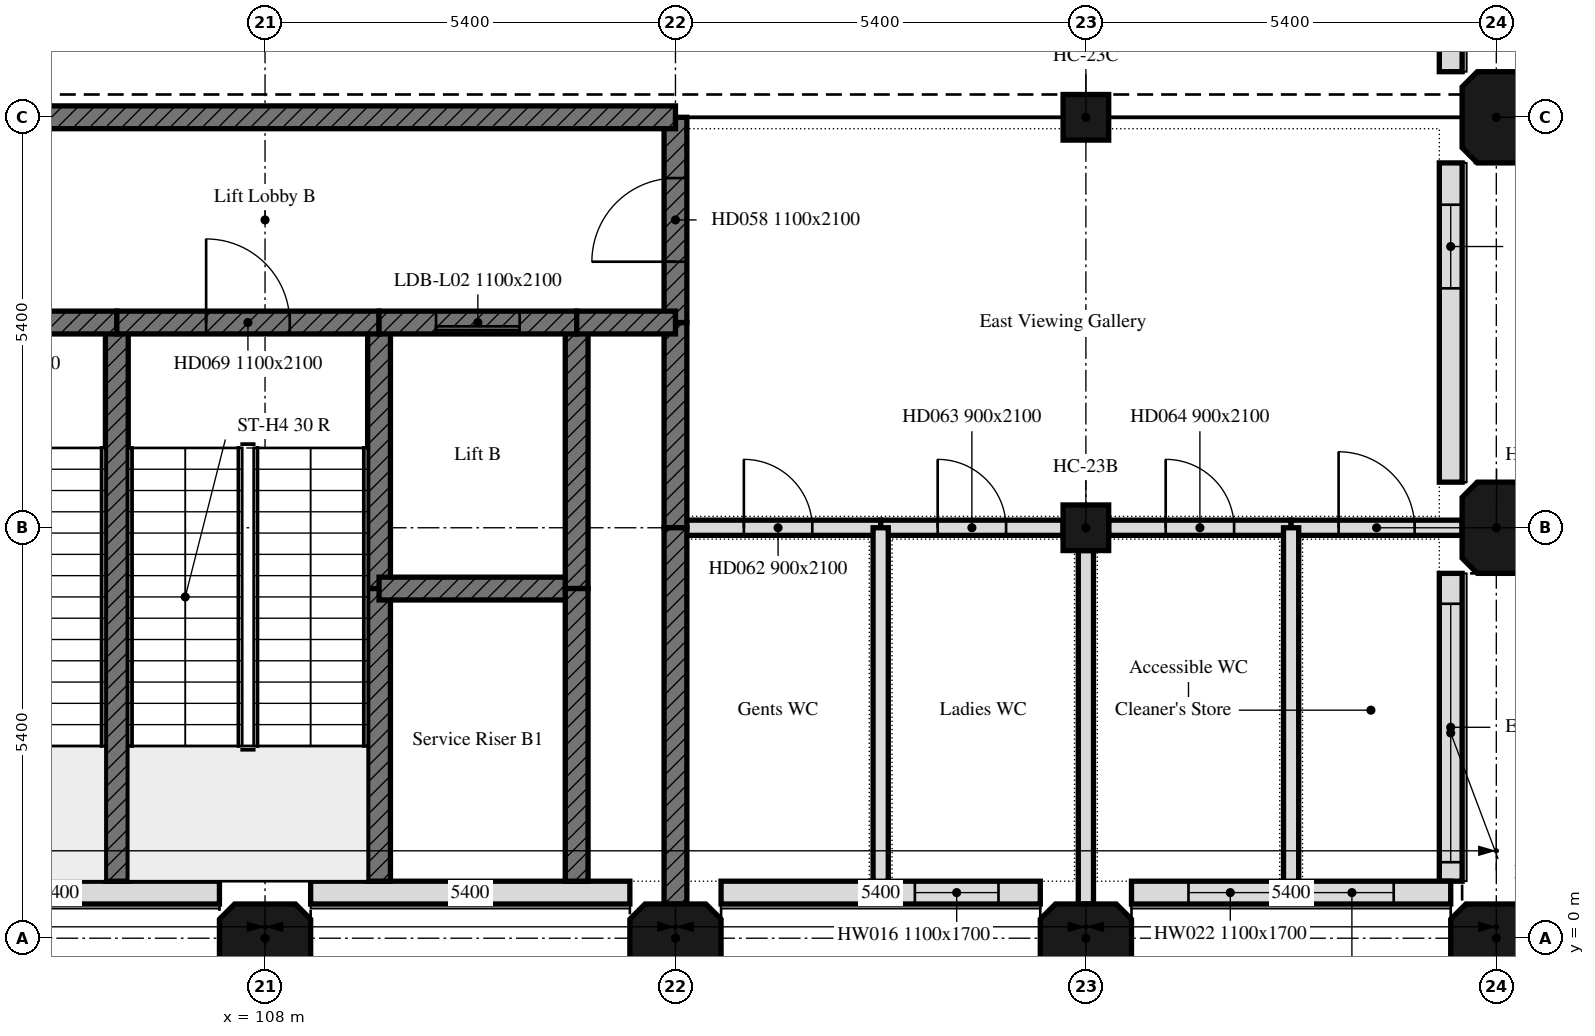
"""IFC4 building model, lengths in metres.
Left out: names, types, materials, properties, quantities, classifications, styles, units other than length and angle.
Written with IfcOpenShell. Run it as: python <this file> out.ifc"""

import sys

from ifc_helpers import new_model, si_unit, direction, frame, frame_2d, origin, origin_2d, place, context, subcontext, project, spatial, polyline, rectangle, outline, extrude, element, fill, save


model = new_model("IFC4")
c1 = context("Model", 3, precision=1e-05, world=origin(), true_north=direction((0.0, 1.0)))
c2 = subcontext(c1, "Body", "Model", "MODEL_VIEW")
j1 = project(units=[si_unit("LENGTHUNIT", "METRE"), si_unit("PLANEANGLEUNIT", "RADIAN")], contexts=[c1])
p1 = place(None, origin())
s1 = spatial("IfcSite", under=j1, at=p1, CompositionType="ELEMENT")
p2 = place(p1, origin())
s2 = spatial("IfcBuilding", under=s1, at=p2, CompositionType="ELEMENT")
p3 = place(p2, frame((0.0, 0.0, 14.4)))
s3 = spatial("IfcBuildingStorey", under=s2, at=p3, CompositionType="ELEMENT", Elevation=14.4)
for number, where, z_axis, x_axis in (
    (1, (108.0, 0.0, 0.0), (0.0, 0.0, 1.0), (1.0, 0.0, 0.0)),
    (2, (113.4, 0.0, 0.0), (0.0, 0.0, 1.0), (1.0, 0.0, 0.0)),
    (3, (118.8, 0.0, 0.0), (0.0, 0.0, 1.0), (1.0, 0.0, 0.0)),
):
    element("IfcColumn", number, at=place(p3, frame(where, z_axis=z_axis, x_axis=x_axis)), inside=s3, PredefinedType="COLUMN", context=c2, shape_type="SweptSolid", body=[
        extrude(outline(polyline([(-0.4, -0.45), (0.4, -0.45), (0.6, -0.25), (0.6, 0.25), (0.4, 0.45), (-0.4, 0.45), (-0.6, 0.25), (-0.6, -0.25), (-0.4, -0.45)])), origin(), (0.0, 0.0, 1.0), 5.1),
    ])
for number, where, z_axis, x_axis in (
    (4, (118.8, 5.4, 0.0), (0.0, 0.0, 1.0), (1.0, 0.0, 0.0)),
    (5, (118.8, 10.8, 0.0), (0.0, 0.0, 1.0), (1.0, 0.0, 0.0)),
):
    element("IfcColumn", number, at=place(p3, frame(where, z_axis=z_axis, x_axis=x_axis)), inside=s3, PredefinedType="COLUMN", context=c2, shape_type="SweptSolid", body=[
        extrude(rectangle(XDim=0.6, YDim=0.6, at=origin_2d()), origin(), (0.0, 0.0, 1.0), 5.1),
    ])
for number, where, z_axis, x_axis in (
    (6, (124.2, 0.0, 0.0), (0.0, 0.0, 1.0), (1.0, 0.0, 0.0)),
    (7, (124.2, 5.4, 0.0), (0.0, 0.0, 1.0), (0.0, 1.0, 0.0)),
    (8, (124.2, 10.8, 0.0), (0.0, 0.0, 1.0), (0.0, 1.0, 0.0)),
):
    element("IfcColumn", number, at=place(p3, frame(where, z_axis=z_axis, x_axis=x_axis)), inside=s3, PredefinedType="COLUMN", context=c2, shape_type="SweptSolid", body=[
        extrude(outline(polyline([(-0.4, -0.45), (0.4, -0.45), (0.6, -0.25), (0.6, 0.25), (0.4, 0.45), (-0.4, 0.45), (-0.6, 0.25), (-0.6, -0.25), (-0.4, -0.45)])), origin(), (0.0, 0.0, 1.0), 5.1),
    ])
for number, where, z_axis, x_axis in (
    (9, (103.2, 0.6, 0.0), (0.0, 0.0, 1.0), (1.0, 0.0, 0.0)),
    (10, (108.6, 0.6, 0.0), (0.0, 0.0, 1.0), (1.0, 0.0, 0.0)),
):
    element("IfcWall", number, at=place(p3, frame(where, z_axis=z_axis, x_axis=x_axis)), inside=s3, PredefinedType="SOLIDWALL", context=c2, shape_type="SweptSolid", body=[
        extrude(rectangle(XDim=4.2, YDim=0.3, at=frame_2d((2.1, 0.0))), origin(), (0.0, 0.0, 1.0), 5.1),
    ])
p4 = place(p3, frame((114.0, 0.6, 0.0), z_axis=(0.0, 0.0, 1.0), x_axis=(1.0, 0.0, 0.0)))
e11 = element("IfcWall", 11, at=p4, inside=s3, PredefinedType="SOLIDWALL", context=c2, shape_type="SweptSolid", body=[
    extrude(rectangle(XDim=4.2, YDim=0.3, at=frame_2d((2.1, 0.0))), origin(), (0.0, 0.0, 1.0), 5.1),
])
p5 = place(p4, frame((2.55, 0.0, 0.9)))
e12 = element("IfcOpeningElement", 12, at=p5, cuts=e11, PredefinedType="OPENING", context=c2, shape_type="SweptSolid", body=[
    extrude(rectangle(XDim=1.1, YDim=1.7, at=frame_2d((0.55, 0.85))), frame((0.0, 0.15, 0.0), z_axis=(0.0, -1.0, 0.0), x_axis=(1.0, 0.0, 0.0)), (0.0, 0.0, 1.0), 0.3),
])
p6 = place(p3, frame((119.4, 0.6, 0.0), z_axis=(0.0, 0.0, 1.0), x_axis=(1.0, 0.0, 0.0)))
e13 = element("IfcWall", 13, at=p6, inside=s3, PredefinedType="SOLIDWALL", context=c2, shape_type="SweptSolid", body=[
    extrude(rectangle(XDim=4.2, YDim=0.3, at=frame_2d((2.1, 0.0))), origin(), (0.0, 0.0, 1.0), 5.1),
])
p7 = place(p6, frame((0.75, 0.0, 0.9)))
e14 = element("IfcOpeningElement", 14, at=p7, cuts=e13, PredefinedType="OPENING", context=c2, shape_type="SweptSolid", body=[
    extrude(rectangle(XDim=1.1, YDim=1.7, at=frame_2d((0.55, 0.85))), frame((0.0, 0.15, 0.0), z_axis=(0.0, -1.0, 0.0), x_axis=(1.0, 0.0, 0.0)), (0.0, 0.0, 1.0), 0.3),
])
p8 = place(p6, frame((2.35, 0.0, 0.9)))
e15 = element("IfcOpeningElement", 15, at=p8, cuts=e13, PredefinedType="OPENING", context=c2, shape_type="SweptSolid", body=[
    extrude(rectangle(XDim=1.1, YDim=1.7, at=frame_2d((0.55, 0.85))), frame((0.0, 0.15, 0.0), z_axis=(0.0, -1.0, 0.0), x_axis=(1.0, 0.0, 0.0)), (0.0, 0.0, 1.0), 0.3),
])
p9 = place(p3, frame((123.6, 0.75, 0.0), z_axis=(0.0, 0.0, 1.0), x_axis=(0.0, 1.0, 0.0)))
e16 = element("IfcWall", 16, at=p9, inside=s3, PredefinedType="SOLIDWALL", context=c2, shape_type="SweptSolid", body=[
    extrude(rectangle(XDim=4.05, YDim=0.3, at=frame_2d((2.025, 0.0))), origin(), (0.0, 0.0, 1.0), 5.1),
])
p10 = place(p9, frame((0.25, 0.0, 0.9)))
e17 = element("IfcOpeningElement", 17, at=p10, cuts=e16, PredefinedType="OPENING", context=c2, shape_type="SweptSolid", body=[
    extrude(rectangle(XDim=3.4, YDim=1.7, at=frame_2d((1.7, 0.85))), frame((0.0, 0.15, 0.0), z_axis=(0.0, -1.0, 0.0), x_axis=(1.0, 0.0, 0.0)), (0.0, 0.0, 1.0), 0.3),
])
p11 = place(p3, frame((123.6, 6.0, 0.0), z_axis=(0.0, 0.0, 1.0), x_axis=(0.0, 1.0, 0.0)))
e18 = element("IfcWall", 18, at=p11, inside=s3, PredefinedType="SOLIDWALL", context=c2, shape_type="SweptSolid", body=[
    extrude(rectangle(XDim=4.2, YDim=0.3, at=frame_2d((2.1, 0.0))), origin(), (0.0, 0.0, 1.0), 5.1),
])
p12 = place(p11, frame((2.55, 0.0, 0.9)))
e19 = element("IfcOpeningElement", 19, at=p12, cuts=e18, PredefinedType="OPENING", context=c2, shape_type="SweptSolid", body=[
    extrude(rectangle(XDim=1.1, YDim=1.7, at=frame_2d((0.55, 0.85))), frame((0.0, 0.15, 0.0), z_axis=(0.0, -1.0, 0.0), x_axis=(1.0, 0.0, 0.0)), (0.0, 0.0, 1.0), 0.3),
])
p13 = place(p3, frame((123.6, 11.4, 0.0), z_axis=(0.0, 0.0, 1.0), x_axis=(0.0, 1.0, 0.0)))
e20 = element("IfcWall", 20, at=p13, inside=s3, PredefinedType="SOLIDWALL", context=c2, shape_type="SweptSolid", body=[
    extrude(rectangle(XDim=4.2, YDim=0.3, at=frame_2d((2.1, 0.0))), origin(), (0.0, 0.0, 1.0), 5.4),
])
p14 = place(p3, frame((113.4, 5.4, 0.0), z_axis=(0.0, 0.0, 1.0), x_axis=(1.0, 0.0, 0.0)))
e21 = element("IfcWall", 21, at=p14, inside=s3, PredefinedType="PARTITIONING", context=c2, shape_type="SweptSolid", body=[
    extrude(rectangle(XDim=2.7, YDim=0.2, at=frame_2d((1.35, 0.0))), origin(), (0.0, 0.0, 1.0), 5.1),
])
p15 = place(p14, frame((0.9, 0.0, 0.0)))
e22 = element("IfcOpeningElement", 22, at=p15, cuts=e21, PredefinedType="OPENING", context=c2, shape_type="SweptSolid", body=[
    extrude(rectangle(XDim=0.9, YDim=2.1, at=frame_2d((0.45, 1.05))), frame((0.0, 0.1, 0.0), z_axis=(0.0, -1.0, 0.0), x_axis=(1.0, 0.0, 0.0)), (0.0, 0.0, 1.0), 0.2),
])
p16 = place(p3, frame((116.1, 5.4, 0.0), z_axis=(0.0, 0.0, 1.0), x_axis=(1.0, 0.0, 0.0)))
e23 = element("IfcWall", 23, at=p16, inside=s3, PredefinedType="PARTITIONING", context=c2, shape_type="SweptSolid", body=[
    extrude(rectangle(XDim=2.4, YDim=0.2, at=frame_2d((1.2, 0.0))), origin(), (0.0, 0.0, 1.0), 5.1),
])
p17 = place(p16, frame((0.75, 0.0, 0.0)))
e24 = element("IfcOpeningElement", 24, at=p17, cuts=e23, PredefinedType="OPENING", context=c2, shape_type="SweptSolid", body=[
    extrude(rectangle(XDim=0.9, YDim=2.1, at=frame_2d((0.45, 1.05))), frame((0.0, 0.1, 0.0), z_axis=(0.0, -1.0, 0.0), x_axis=(1.0, 0.0, 0.0)), (0.0, 0.0, 1.0), 0.2),
])
p18 = place(p3, frame((119.1, 5.4, 0.0), z_axis=(0.0, 0.0, 1.0), x_axis=(1.0, 0.0, 0.0)))
e25 = element("IfcWall", 25, at=p18, inside=s3, PredefinedType="PARTITIONING", context=c2, shape_type="SweptSolid", body=[
    extrude(rectangle(XDim=2.4, YDim=0.2, at=frame_2d((1.2, 0.0))), origin(), (0.0, 0.0, 1.0), 5.1),
])
p19 = place(p18, frame((0.75, 0.0, 0.0)))
e26 = element("IfcOpeningElement", 26, at=p19, cuts=e25, PredefinedType="OPENING", context=c2, shape_type="SweptSolid", body=[
    extrude(rectangle(XDim=0.9, YDim=2.1, at=frame_2d((0.45, 1.05))), frame((0.0, 0.1, 0.0), z_axis=(0.0, -1.0, 0.0), x_axis=(1.0, 0.0, 0.0)), (0.0, 0.0, 1.0), 0.2),
])
p20 = place(p3, frame((121.5, 5.4, 0.0), z_axis=(0.0, 0.0, 1.0), x_axis=(1.0, 0.0, 0.0)))
e27 = element("IfcWall", 27, at=p20, inside=s3, PredefinedType="PARTITIONING", context=c2, shape_type="SweptSolid", body=[
    extrude(rectangle(XDim=2.25, YDim=0.2, at=frame_2d((1.125, 0.0))), origin(), (0.0, 0.0, 1.0), 5.1),
])
p21 = place(p20, frame((0.625, 0.0, 0.0)))
e28 = element("IfcOpeningElement", 28, at=p21, cuts=e27, PredefinedType="OPENING", context=c2, shape_type="SweptSolid", body=[
    extrude(rectangle(XDim=1.0, YDim=2.1, at=frame_2d((0.5, 1.05))), frame((0.0, 0.1, 0.0), z_axis=(0.0, -1.0, 0.0), x_axis=(1.0, 0.0, 0.0)), (0.0, 0.0, 1.0), 0.2),
])
p22 = place(p3, frame((113.4, 5.4, 0.0), z_axis=(0.0, 0.0, 1.0), x_axis=(0.0, 1.0, 0.0)))
e29 = element("IfcWall", 29, at=p22, inside=s3, PredefinedType="SHEAR", context=c2, shape_type="SweptSolid", body=[
    extrude(rectangle(XDim=2.7, YDim=0.3, at=frame_2d((1.35, 0.0))), origin(), (0.0, 0.0, 1.0), 5.1),
])
p23 = place(p3, frame((113.4, 8.1, 0.0), z_axis=(0.0, 0.0, 1.0), x_axis=(0.0, 1.0, 0.0)))
e30 = element("IfcWall", 30, at=p23, inside=s3, PredefinedType="SHEAR", context=c2, shape_type="SweptSolid", body=[
    extrude(rectangle(XDim=2.7, YDim=0.3, at=frame_2d((1.35, 0.0))), origin(), (0.0, 0.0, 1.0), 5.1),
])
p24 = place(p23, frame((0.8, 0.0, 0.0)))
e31 = element("IfcOpeningElement", 31, at=p24, cuts=e30, PredefinedType="OPENING", context=c2, shape_type="SweptSolid", body=[
    extrude(rectangle(XDim=1.1, YDim=2.1, at=frame_2d((0.55, 1.05))), frame((0.0, 0.15, 0.0), z_axis=(0.0, -1.0, 0.0), x_axis=(1.0, 0.0, 0.0)), (0.0, 0.0, 1.0), 0.3),
])
p25 = place(p3, frame((116.1, 0.75, 0.0), z_axis=(0.0, 0.0, 1.0), x_axis=(0.0, 1.0, 0.0)))
e32 = element("IfcWall", 32, at=p25, inside=s3, PredefinedType="PARTITIONING", context=c2, shape_type="SweptSolid", body=[
    extrude(rectangle(XDim=4.65, YDim=0.2, at=frame_2d((2.325, 0.0))), origin(), (0.0, 0.0, 1.0), 5.1),
])
p26 = place(p3, frame((113.4, 0.45, 0.0), z_axis=(0.0, 0.0, 1.0), x_axis=(0.0, 1.0, 0.0)))
e33 = element("IfcWall", 33, at=p26, inside=s3, PredefinedType="SHEAR", context=c2, shape_type="SweptSolid", body=[
    extrude(rectangle(XDim=4.95, YDim=0.3, at=frame_2d((2.475, 0.0))), origin(), (0.0, 0.0, 1.0), 5.1),
])
p27 = place(p3, frame((118.8, 0.45, 0.0), z_axis=(0.0, 0.0, 1.0), x_axis=(0.0, 1.0, 0.0)))
e34 = element("IfcWall", 34, at=p27, inside=s3, PredefinedType="PARTITIONING", context=c2, shape_type="SweptSolid", body=[
    extrude(rectangle(XDim=4.65, YDim=0.2, at=frame_2d((2.325, 0.0))), origin(), (0.0, 0.0, 1.0), 5.1),
])
p28 = place(p3, frame((121.5, 0.75, 0.0), z_axis=(0.0, 0.0, 1.0), x_axis=(0.0, 1.0, 0.0)))
e35 = element("IfcWall", 35, at=p28, inside=s3, PredefinedType="PARTITIONING", context=c2, shape_type="SweptSolid", body=[
    extrude(rectangle(XDim=4.65, YDim=0.2, at=frame_2d((2.325, 0.0))), origin(), (0.0, 0.0, 1.0), 5.1),
])
p29 = place(p3, frame((106.05, 0.75, 0.0), z_axis=(0.0, 0.0, 1.0), x_axis=(0.0, 1.0, 0.0)))
e36 = element("IfcWall", 36, at=p29, inside=s3, PredefinedType="SHEAR", context=c2, shape_type="SweptSolid", body=[
    extrude(rectangle(XDim=7.35, YDim=0.3, at=frame_2d((3.675, 0.0))), origin(), (0.0, 0.0, 1.0), 5.1),
])
p30 = place(p3, frame((102.6, 8.1, 0.0), z_axis=(0.0, 0.0, 1.0), x_axis=(1.0, 0.0, 0.0)))
e37 = element("IfcWall", 37, at=p30, inside=s3, PredefinedType="SHEAR", context=c2, shape_type="SweptSolid", body=[
    extrude(rectangle(XDim=3.45, YDim=0.3, at=frame_2d((1.725, 0.0))), origin(), (0.0, 0.0, 1.0), 5.1),
])
p31 = place(p30, frame((1.175, 0.0, 0.0)))
e38 = element("IfcOpeningElement", 38, at=p31, cuts=e37, PredefinedType="OPENING", context=c2, shape_type="SweptSolid", body=[
    extrude(rectangle(XDim=1.1, YDim=2.1, at=frame_2d((0.55, 1.05))), frame((0.0, 0.15, 0.0), z_axis=(0.0, -1.0, 0.0), x_axis=(1.0, 0.0, 0.0)), (0.0, 0.0, 1.0), 0.3),
])
p32 = place(p3, frame((109.5, 4.6, 0.0), z_axis=(0.0, 0.0, 1.0), x_axis=(0.0, 1.0, 0.0)))
e39 = element("IfcWall", 39, at=p32, inside=s3, PredefinedType="SHEAR", context=c2, shape_type="SweptSolid", body=[
    extrude(rectangle(XDim=3.5, YDim=0.3, at=frame_2d((1.75, 0.0))), origin(), (0.0, 0.0, 1.0), 5.1),
])
p33 = place(p3, frame((109.5, 0.75, 0.0), z_axis=(0.0, 0.0, 1.0), x_axis=(0.0, 1.0, 0.0)))
e40 = element("IfcWall", 40, at=p33, inside=s3, PredefinedType="SHEAR", context=c2, shape_type="SweptSolid", body=[
    extrude(rectangle(XDim=3.85, YDim=0.3, at=frame_2d((1.925, 0.0))), origin(), (0.0, 0.0, 1.0), 5.1),
])
p34 = place(p3, frame((106.05, 8.1, 0.0), z_axis=(0.0, 0.0, 1.0), x_axis=(1.0, 0.0, 0.0)))
e41 = element("IfcWall", 41, at=p34, inside=s3, PredefinedType="SHEAR", context=c2, shape_type="SweptSolid", body=[
    extrude(rectangle(XDim=3.45, YDim=0.3, at=frame_2d((1.725, 0.0))), origin(), (0.0, 0.0, 1.0), 5.1),
])
p35 = place(p34, frame((1.175, 0.0, 0.0)))
e42 = element("IfcOpeningElement", 42, at=p35, cuts=e41, PredefinedType="OPENING", context=c2, shape_type="SweptSolid", body=[
    extrude(rectangle(XDim=1.1, YDim=2.1, at=frame_2d((0.55, 1.05))), frame((0.0, 0.15, 0.0), z_axis=(0.0, -1.0, 0.0), x_axis=(1.0, 0.0, 0.0)), (0.0, 0.0, 1.0), 0.3),
])
p36 = place(p3, frame((109.5, 4.6, 0.0), z_axis=(0.0, 0.0, 1.0), x_axis=(1.0, 0.0, 0.0)))
e43 = element("IfcWall", 43, at=p36, inside=s3, PredefinedType="SHEAR", context=c2, shape_type="SweptSolid", body=[
    extrude(rectangle(XDim=2.6, YDim=0.3, at=frame_2d((1.3, 0.0))), origin(), (0.0, 0.0, 1.0), 5.1),
])
p37 = place(p3, frame((112.1, 4.6, 0.0), z_axis=(0.0, 0.0, 1.0), x_axis=(0.0, 1.0, 0.0)))
e44 = element("IfcWall", 44, at=p37, inside=s3, PredefinedType="SHEAR", context=c2, shape_type="SweptSolid", body=[
    extrude(rectangle(XDim=3.5, YDim=0.3, at=frame_2d((1.75, 0.0))), origin(), (0.0, 0.0, 1.0), 5.1),
])
p38 = place(p3, frame((109.5, 8.1, 0.0), z_axis=(0.0, 0.0, 1.0), x_axis=(1.0, 0.0, 0.0)))
e45 = element("IfcWall", 45, at=p38, inside=s3, PredefinedType="SHEAR", context=c2, shape_type="SweptSolid", body=[
    extrude(rectangle(XDim=2.6, YDim=0.3, at=frame_2d((1.3, 0.0))), origin(), (0.0, 0.0, 1.0), 5.1),
])
p39 = place(p38, frame((0.75, 0.0, 0.0)))
e46 = element("IfcOpeningElement", 46, at=p39, cuts=e45, PredefinedType="OPENING", context=c2, shape_type="SweptSolid", body=[
    extrude(rectangle(XDim=1.1, YDim=2.1, at=frame_2d((0.55, 1.05))), frame((0.0, 0.15, 0.0), z_axis=(0.0, -1.0, 0.0), x_axis=(1.0, 0.0, 0.0)), (0.0, 0.0, 1.0), 0.3),
])
p40 = place(p3, frame((112.1, 0.75, 0.0), z_axis=(0.0, 0.0, 1.0), x_axis=(0.0, 1.0, 0.0)))
e47 = element("IfcWall", 47, at=p40, inside=s3, PredefinedType="SHEAR", context=c2, shape_type="SweptSolid", body=[
    extrude(rectangle(XDim=3.85, YDim=0.3, at=frame_2d((1.925, 0.0))), origin(), (0.0, 0.0, 1.0), 5.1),
])
p41 = place(p3, frame((112.1, 8.1, 0.0), z_axis=(0.0, 0.0, 1.0), x_axis=(1.0, 0.0, 0.0)))
e48 = element("IfcWall", 48, at=p41, inside=s3, PredefinedType="SHEAR", context=c2, shape_type="SweptSolid", body=[
    extrude(rectangle(XDim=1.3, YDim=0.3, at=frame_2d((0.65, 0.0))), origin(), (0.0, 0.0, 1.0), 5.1),
])
p42 = place(p3, frame((102.6, 10.8, 0.0), z_axis=(0.0, 0.0, 1.0), x_axis=(1.0, 0.0, 0.0)))
e49 = element("IfcWall", 49, at=p42, inside=s3, PredefinedType="SHEAR", context=c2, shape_type="SweptSolid", body=[
    extrude(rectangle(XDim=10.8, YDim=0.3, at=frame_2d((5.4, 0.0))), origin(), (0.0, 0.0, 1.0), 5.1),
])
p43 = place(p5, origin())
e50 = element("IfcWindow", 50, at=p43, inside=s3, PartitioningType="SINGLE_PANEL", PredefinedType="WINDOW", context=c2, shape_type="SweptSolid", body=[
    extrude(rectangle(XDim=1.1, YDim=1.7, at=frame_2d((0.55, 0.85))), frame((0.0, 0.03, 0.0), z_axis=(0.0, -1.0, 0.0), x_axis=(1.0, 0.0, 0.0)), (0.0, 0.0, 1.0), 0.06),
])
fill(e12, e50)
p44 = place(p7, origin())
e51 = element("IfcWindow", 51, at=p44, inside=s3, PartitioningType="SINGLE_PANEL", PredefinedType="WINDOW", context=c2, shape_type="SweptSolid", body=[
    extrude(rectangle(XDim=1.1, YDim=1.7, at=frame_2d((0.55, 0.85))), frame((0.0, 0.03, 0.0), z_axis=(0.0, -1.0, 0.0), x_axis=(1.0, 0.0, 0.0)), (0.0, 0.0, 1.0), 0.06),
])
fill(e14, e51)
p45 = place(p8, origin())
e52 = element("IfcWindow", 52, at=p45, inside=s3, PartitioningType="SINGLE_PANEL", PredefinedType="WINDOW", context=c2, shape_type="SweptSolid", body=[
    extrude(rectangle(XDim=1.1, YDim=1.7, at=frame_2d((0.55, 0.85))), frame((0.0, 0.03, 0.0), z_axis=(0.0, -1.0, 0.0), x_axis=(1.0, 0.0, 0.0)), (0.0, 0.0, 1.0), 0.06),
])
fill(e15, e52)
p46 = place(p10, origin())
e53 = element("IfcWindow", 53, at=p46, inside=s3, PartitioningType="SINGLE_PANEL", PredefinedType="WINDOW", context=c2, shape_type="SweptSolid", body=[
    extrude(rectangle(XDim=3.4, YDim=1.7, at=frame_2d((1.7, 0.85))), frame((0.0, 0.03, 0.0), z_axis=(0.0, -1.0, 0.0), x_axis=(1.0, 0.0, 0.0)), (0.0, 0.0, 1.0), 0.06),
])
fill(e17, e53)
p47 = place(p12, origin())
e54 = element("IfcWindow", 54, at=p47, inside=s3, PartitioningType="SINGLE_PANEL", PredefinedType="WINDOW", context=c2, shape_type="SweptSolid", body=[
    extrude(rectangle(XDim=1.1, YDim=1.7, at=frame_2d((0.55, 0.85))), frame((0.0, 0.03, 0.0), z_axis=(0.0, -1.0, 0.0), x_axis=(1.0, 0.0, 0.0)), (0.0, 0.0, 1.0), 0.06),
])
fill(e19, e54)
p48 = place(p24, origin())
e55 = element("IfcDoor", 55, at=p48, inside=s3, OperationType="SINGLE_SWING_LEFT", PredefinedType="DOOR", context=c2, shape_type="SweptSolid", body=[
    extrude(rectangle(XDim=1.1, YDim=2.1, at=frame_2d((0.55, 1.05))), frame((0.0, 0.025, 0.0), z_axis=(0.0, -1.0, 0.0), x_axis=(1.0, 0.0, 0.0)), (0.0, 0.0, 1.0), 0.05),
])
fill(e31, e55)
p49 = place(p15, origin())
e56 = element("IfcDoor", 56, at=p49, inside=s3, OperationType="SINGLE_SWING_LEFT", PredefinedType="DOOR", context=c2, shape_type="SweptSolid", body=[
    extrude(rectangle(XDim=0.9, YDim=2.1, at=frame_2d((0.45, 1.05))), frame((0.0, 0.025, 0.0), z_axis=(0.0, -1.0, 0.0), x_axis=(1.0, 0.0, 0.0)), (0.0, 0.0, 1.0), 0.05),
])
fill(e22, e56)
p50 = place(p17, origin())
e57 = element("IfcDoor", 57, at=p50, inside=s3, OperationType="SINGLE_SWING_LEFT", PredefinedType="DOOR", context=c2, shape_type="SweptSolid", body=[
    extrude(rectangle(XDim=0.9, YDim=2.1, at=frame_2d((0.45, 1.05))), frame((0.0, 0.025, 0.0), z_axis=(0.0, -1.0, 0.0), x_axis=(1.0, 0.0, 0.0)), (0.0, 0.0, 1.0), 0.05),
])
fill(e24, e57)
p51 = place(p19, origin())
e58 = element("IfcDoor", 58, at=p51, inside=s3, OperationType="SINGLE_SWING_LEFT", PredefinedType="DOOR", context=c2, shape_type="SweptSolid", body=[
    extrude(rectangle(XDim=0.9, YDim=2.1, at=frame_2d((0.45, 1.05))), frame((0.0, 0.025, 0.0), z_axis=(0.0, -1.0, 0.0), x_axis=(1.0, 0.0, 0.0)), (0.0, 0.0, 1.0), 0.05),
])
fill(e26, e58)
p52 = place(p21, origin())
e59 = element("IfcDoor", 59, at=p52, inside=s3, OperationType="SINGLE_SWING_LEFT", PredefinedType="DOOR", context=c2, shape_type="SweptSolid", body=[
    extrude(rectangle(XDim=1.0, YDim=2.1, at=frame_2d((0.5, 1.05))), frame((0.0, 0.025, 0.0), z_axis=(0.0, -1.0, 0.0), x_axis=(1.0, 0.0, 0.0)), (0.0, 0.0, 1.0), 0.05),
])
fill(e28, e59)
p53 = place(p35, origin())
e60 = element("IfcDoor", 60, at=p53, inside=s3, OperationType="SINGLE_SWING_LEFT", PredefinedType="DOOR", context=c2, shape_type="SweptSolid", body=[
    extrude(rectangle(XDim=1.1, YDim=2.1, at=frame_2d((0.55, 1.05))), frame((0.0, 0.025, 0.0), z_axis=(0.0, -1.0, 0.0), x_axis=(1.0, 0.0, 0.0)), (0.0, 0.0, 1.0), 0.05),
])
fill(e42, e60)
p54 = place(p39, origin())
e61 = element("IfcDoor", 61, at=p54, inside=s3, OperationType="SLIDING_TO_LEFT", PredefinedType="DOOR", context=c2, shape_type="SweptSolid", body=[
    extrude(rectangle(XDim=1.1, YDim=2.1, at=frame_2d((0.55, 1.05))), frame((0.0, 0.025, 0.0), z_axis=(0.0, -1.0, 0.0), x_axis=(1.0, 0.0, 0.0)), (0.0, 0.0, 1.0), 0.05),
])
fill(e46, e61)
save(model, sys.argv[1])
